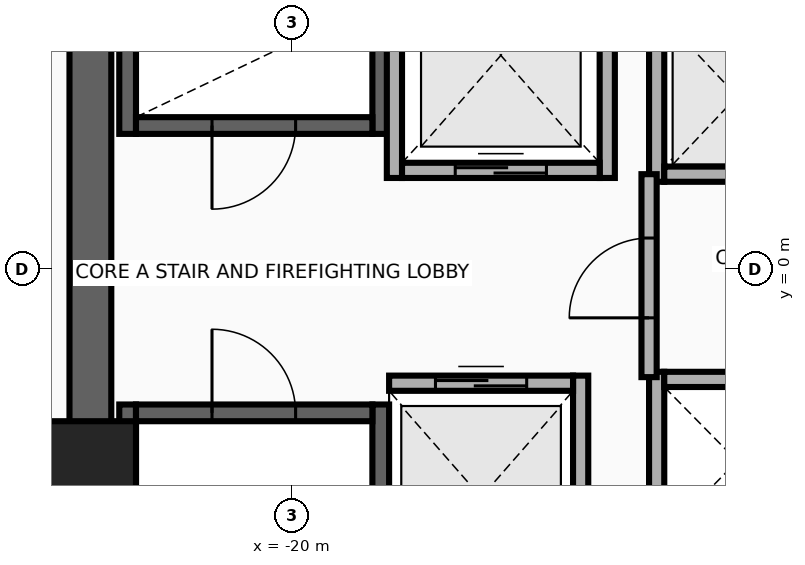
"""IFC4 building model, lengths in metres.
Left out: names, types, materials, properties, quantities, classifications, styles, units other than length and angle.
Written with IfcOpenShell. Run it as: python <this file> out.ifc"""

import sys

from ifc_helpers import new_model, si_unit, direction, frame, frame_2d, origin, origin_2d, place, context, subcontext, project, spatial, rectangle, extrude, source, transform, mapped, element, fill, save


model = new_model("IFC4")
c1 = context("Model", 3, precision=1e-05, world=origin(), true_north=direction((0.0, 1.0)))
c2 = subcontext(c1, "Body", "Model", "MODEL_VIEW")
j1 = project(units=[si_unit("LENGTHUNIT", "METRE"), si_unit("PLANEANGLEUNIT", "RADIAN")], contexts=[c1])
p1 = place(None, origin())
s1 = spatial("IfcSite", under=j1, at=p1, CompositionType="ELEMENT")
p2 = place(p1, origin())
s2 = spatial("IfcBuilding", under=s1, at=p2, CompositionType="ELEMENT")
p3 = place(p2, frame((0.0, 0.0, 164.9)))
s3 = spatial("IfcBuildingStorey", under=s2, at=p3, CompositionType="ELEMENT", Elevation=164.9)
for number, where, z_axis, x_axis in (
    (1, (-22.16, 1.78, 0.0), (0.0, 0.0, 1.0), (0.0, 1.0, 0.0)),
    (2, (-18.83, 1.78, 0.0), (0.0, 0.0, 1.0), (0.0, 1.0, 0.0)),
):
    element("IfcWall", number, at=place(p3, frame(where, z_axis=z_axis, x_axis=x_axis)), inside=s3, PredefinedType="SHEAR", context=c2, shape_type="SweptSolid", body=[
        extrude(rectangle(XDim=8.745, YDim=0.22, at=frame_2d((4.373, 0.0))), origin(), (0.0, 0.0, 1.0), 3.46),
    ])
p4 = place(p3, frame((-22.05, 1.89, 0.0), z_axis=(0.0, 0.0, 1.0), x_axis=(1.0, 0.0, 0.0)))
e3 = element("IfcWall", 3, at=p4, inside=s3, PredefinedType="SHEAR", context=c2, shape_type="SweptSolid", body=[
    extrude(rectangle(XDim=3.11, YDim=0.22, at=frame_2d((1.555, 0.0))), origin(), (0.0, 0.0, 1.0), 3.46),
])
p5 = place(p4, frame((1.0, 0.0, 0.0)))
e4 = element("IfcOpeningElement", 4, at=p5, cuts=e3, PredefinedType="OPENING", context=c2, shape_type="SweptSolid", body=[
    extrude(rectangle(XDim=1.1, YDim=2.15, at=frame_2d((0.55, 1.075))), frame((0.0, 0.125, 0.0), z_axis=(0.0, -1.0, 0.0), x_axis=(1.0, 0.0, 0.0)), (0.0, 0.0, 1.0), 0.25),
])
for number, where, z_axis, x_axis in (
    (5, (-22.16, -10.525, 0.0), (0.0, 0.0, 1.0), (0.0, 1.0, 0.0)),
    (6, (-18.83, -10.525, 0.0), (0.0, 0.0, 1.0), (0.0, 1.0, 0.0)),
):
    element("IfcWall", number, at=place(p3, frame(where, z_axis=z_axis, x_axis=x_axis)), inside=s3, PredefinedType="SHEAR", context=c2, shape_type="SweptSolid", body=[
        extrude(rectangle(XDim=8.745, YDim=0.22, at=frame_2d((4.373, 0.0))), origin(), (0.0, 0.0, 1.0), 3.46),
    ])
p6 = place(p3, frame((-22.05, -1.89, 0.0), z_axis=(0.0, 0.0, 1.0), x_axis=(1.0, 0.0, 0.0)))
e7 = element("IfcWall", 7, at=p6, inside=s3, PredefinedType="SHEAR", context=c2, shape_type="SweptSolid", body=[
    extrude(rectangle(XDim=3.11, YDim=0.22, at=frame_2d((1.555, 0.0))), origin(), (0.0, 0.0, 1.0), 3.46),
])
p7 = place(p6, frame((1.0, 0.0, 0.0)))
e8 = element("IfcOpeningElement", 8, at=p7, cuts=e7, PredefinedType="OPENING", context=c2, shape_type="SweptSolid", body=[
    extrude(rectangle(XDim=1.1, YDim=2.15, at=frame_2d((0.55, 1.075))), frame((0.0, 0.125, 0.0), z_axis=(0.0, -1.0, 0.0), x_axis=(1.0, 0.0, 0.0)), (0.0, 0.0, 1.0), 0.25),
])
p8 = place(p3, frame((-22.65, -11.075, 0.0), z_axis=(0.0, 0.0, 1.0), x_axis=(0.0, 1.0, 0.0)))
e9 = element("IfcWall", 9, at=p8, inside=s3, PredefinedType="SHEAR", context=c2, shape_type="SweptSolid", body=[
    extrude(rectangle(XDim=22.15, YDim=0.55, at=frame_2d((11.075, 0.0))), origin(), (0.0, 0.0, 1.0), 3.46),
])
m1 = source(origin(), c2, "Body", "SweptSolid", [
    extrude(rectangle(XDim=1.2, YDim=1.2, at=origin_2d()), origin(), (0.0, 0.0, 1.0), 3.7),
])
p9 = place(p3, frame((-22.65, -2.6, 0.0), z_axis=(0.0, 0.0, 1.0), x_axis=(1.0, 0.0, 0.0)))
e10 = element("IfcColumn", 10, at=p9, inside=s3, PredefinedType="COLUMN", context=c2, shape_type="MappedRepresentation", body=[
    mapped(m1, transform((0.0, 0.0, 0.0), x_axis=(1.0, 0.0, 0.0), y_axis=(0.0, 1.0, 0.0), z_axis=(0.0, 0.0, 1.0), scale=1.0)),
])
for number, where, z_axis, x_axis in (
    (11, (-18.65, 1.2, 0.0), (0.0, 0.0, 1.0), (0.0, 1.0, 0.0)),
    (12, (-15.85, 1.2, 0.0), (0.0, 0.0, 1.0), (0.0, 1.0, 0.0)),
):
    element("IfcWall", number, at=place(p3, frame(where, z_axis=z_axis, x_axis=x_axis)), inside=s3, PredefinedType="MOVABLE", context=c2, shape_type="SweptSolid", body=[
        extrude(rectangle(XDim=3.225, YDim=0.2, at=frame_2d((1.613, 0.0))), origin(), (0.0, 0.0, 1.0), 3.46),
    ])
p10 = place(p3, frame((-18.55, 1.3, 0.0), z_axis=(0.0, 0.0, 1.0), x_axis=(1.0, 0.0, 0.0)))
e13 = element("IfcWall", 13, at=p10, inside=s3, PredefinedType="MOVABLE", context=c2, shape_type="SweptSolid", body=[
    extrude(rectangle(XDim=2.6, YDim=0.2, at=frame_2d((1.3, 0.0))), origin(), (0.0, 0.0, 1.0), 3.46),
])
p11 = place(p10, frame((0.7, 0.0, 0.0)))
e14 = element("IfcOpeningElement", 14, at=p11, cuts=e13, PredefinedType="OPENING", context=c2, shape_type="SweptSolid", body=[
    extrude(rectangle(XDim=1.2, YDim=2.1, at=frame_2d((0.6, 1.05))), frame((0.0, 0.115, 0.0), z_axis=(0.0, -1.0, 0.0), x_axis=(1.0, 0.0, 0.0)), (0.0, 0.0, 1.0), 0.23),
])
p12 = place(p3, frame((-16.2, -4.6, 0.0), z_axis=(0.0, 0.0, 1.0), x_axis=(0.0, 1.0, 0.0)))
e15 = element("IfcWall", 15, at=p12, inside=s3, PredefinedType="MOVABLE", context=c2, shape_type="SweptSolid", body=[
    extrude(rectangle(XDim=3.2, YDim=0.2, at=frame_2d((1.6, 0.0))), origin(), (0.0, 0.0, 1.0), 3.46),
])
p13 = place(p3, frame((-18.72, -1.5, 0.0), z_axis=(0.0, 0.0, 1.0), x_axis=(1.0, 0.0, 0.0)))
e16 = element("IfcWall", 16, at=p13, inside=s3, PredefinedType="MOVABLE", context=c2, shape_type="SweptSolid", body=[
    extrude(rectangle(XDim=2.42, YDim=0.2, at=frame_2d((1.21, 0.0))), origin(), (0.0, 0.0, 1.0), 3.46),
])
p14 = place(p13, frame((0.61, 0.0, 0.0)))
e17 = element("IfcOpeningElement", 17, at=p14, cuts=e16, PredefinedType="OPENING", context=c2, shape_type="SweptSolid", body=[
    extrude(rectangle(XDim=1.2, YDim=2.1, at=frame_2d((0.6, 1.05))), frame((0.0, 0.115, 0.0), z_axis=(0.0, -1.0, 0.0), x_axis=(1.0, 0.0, 0.0)), (0.0, 0.0, 1.0), 0.23),
])
p15 = place(p3, frame((-15.2, 1.15, 0.0), z_axis=(0.0, 0.0, 1.0), x_axis=(0.0, 1.0, 0.0)))
e18 = element("IfcWall", 18, at=p15, inside=s3, PredefinedType="MOVABLE", context=c2, shape_type="SweptSolid", body=[
    extrude(rectangle(XDim=2.25, YDim=0.2, at=frame_2d((1.125, 0.0))), origin(), (0.0, 0.0, 1.0), 3.46),
])
p16 = place(p3, frame((-15.1, 1.25, 0.0), z_axis=(0.0, 0.0, 1.0), x_axis=(1.0, 0.0, 0.0)))
e19 = element("IfcWall", 19, at=p16, inside=s3, PredefinedType="MOVABLE", context=c2, shape_type="SweptSolid", body=[
    extrude(rectangle(XDim=1.92, YDim=0.2, at=frame_2d((0.96, 0.0))), origin(), (0.0, 0.0, 1.0), 3.46),
])
p17 = place(p3, frame((-15.2, -3.7, 0.0), z_axis=(0.0, 0.0, 1.0), x_axis=(0.0, 1.0, 0.0)))
e20 = element("IfcWall", 20, at=p17, inside=s3, PredefinedType="MOVABLE", context=c2, shape_type="SweptSolid", body=[
    extrude(rectangle(XDim=2.35, YDim=0.2, at=frame_2d((1.175, 0.0))), origin(), (0.0, 0.0, 1.0), 3.46),
])
p18 = place(p3, frame((-15.1, -1.45, 0.0), z_axis=(0.0, 0.0, 1.0), x_axis=(1.0, 0.0, 0.0)))
e21 = element("IfcWall", 21, at=p18, inside=s3, PredefinedType="MOVABLE", context=c2, shape_type="SweptSolid", body=[
    extrude(rectangle(XDim=1.92, YDim=0.2, at=frame_2d((0.96, 0.0))), origin(), (0.0, 0.0, 1.0), 3.46),
])
p19 = place(p3, frame((-15.3, -1.42, 0.0), z_axis=(0.0, 0.0, 1.0), x_axis=(0.0, 1.0, 0.0)))
e22 = element("IfcWall", 22, at=p19, inside=s3, PredefinedType="PARTITIONING", context=c2, shape_type="SweptSolid", body=[
    extrude(rectangle(XDim=2.67, YDim=0.2, at=frame_2d((1.335, 0.0))), origin(), (0.0, 0.0, 1.0), 3.46),
])
p20 = place(p19, frame((0.78, 0.0, 0.0)))
e23 = element("IfcOpeningElement", 23, at=p20, cuts=e22, PredefinedType="OPENING", context=c2, shape_type="SweptSolid", body=[
    extrude(rectangle(XDim=1.05, YDim=2.15, at=frame_2d((0.525, 1.075))), frame((0.0, 0.115, 0.0), z_axis=(0.0, -1.0, 0.0), x_axis=(1.0, 0.0, 0.0)), (0.0, 0.0, 1.0), 0.23),
])
p21 = place(p11, origin())
e24 = element("IfcDoor", 24, at=p21, inside=s3, OperationType="DOUBLE_DOOR_SLIDING", PredefinedType="DOOR", context=c2, shape_type="SweptSolid", body=[
    extrude(rectangle(XDim=1.2, YDim=2.1, at=frame_2d((0.6, 1.05))), frame((0.0, 0.025, 0.0), z_axis=(0.0, -1.0, 0.0), x_axis=(1.0, 0.0, 0.0)), (0.0, 0.0, 1.0), 0.05),
])
fill(e14, e24)
p22 = place(p14, origin())
e25 = element("IfcDoor", 25, at=p22, inside=s3, OperationType="DOUBLE_DOOR_SLIDING", PredefinedType="DOOR", context=c2, shape_type="SweptSolid", body=[
    extrude(rectangle(XDim=1.2, YDim=2.1, at=frame_2d((0.6, 1.05))), frame((0.0, 0.025, 0.0), z_axis=(0.0, -1.0, 0.0), x_axis=(1.0, 0.0, 0.0)), (0.0, 0.0, 1.0), 0.05),
])
fill(e17, e25)
p23 = place(p20, origin())
e26 = element("IfcDoor", 26, at=p23, inside=s3, OperationType="SINGLE_SWING_RIGHT", PredefinedType="DOOR", context=c2, shape_type="SweptSolid", body=[
    extrude(rectangle(XDim=1.05, YDim=2.15, at=frame_2d((0.525, 1.075))), frame((0.0, 0.025, 0.0), z_axis=(0.0, -1.0, 0.0), x_axis=(1.0, 0.0, 0.0)), (0.0, 0.0, 1.0), 0.05),
])
fill(e23, e26)
p24 = place(p5, frame((1.1, 0.0, 0.0), z_axis=(0.0, 0.0, 1.0), x_axis=(-1.0, 0.0, 0.0)))
e27 = element("IfcDoor", 27, at=p24, inside=s3, OperationType="SINGLE_SWING_LEFT", PredefinedType="DOOR", context=c2, shape_type="SweptSolid", body=[
    extrude(rectangle(XDim=1.1, YDim=2.15, at=frame_2d((0.55, 1.075))), frame((0.0, 0.025, 0.0), z_axis=(0.0, -1.0, 0.0), x_axis=(1.0, 0.0, 0.0)), (0.0, 0.0, 1.0), 0.05),
])
fill(e4, e27)
p25 = place(p7, origin())
e28 = element("IfcDoor", 28, at=p25, inside=s3, OperationType="SINGLE_SWING_RIGHT", PredefinedType="DOOR", context=c2, shape_type="SweptSolid", body=[
    extrude(rectangle(XDim=1.1, YDim=2.15, at=frame_2d((0.55, 1.075))), frame((0.0, 0.025, 0.0), z_axis=(0.0, -1.0, 0.0), x_axis=(1.0, 0.0, 0.0)), (0.0, 0.0, 1.0), 0.05),
])
fill(e8, e28)
save(model, sys.argv[1])
